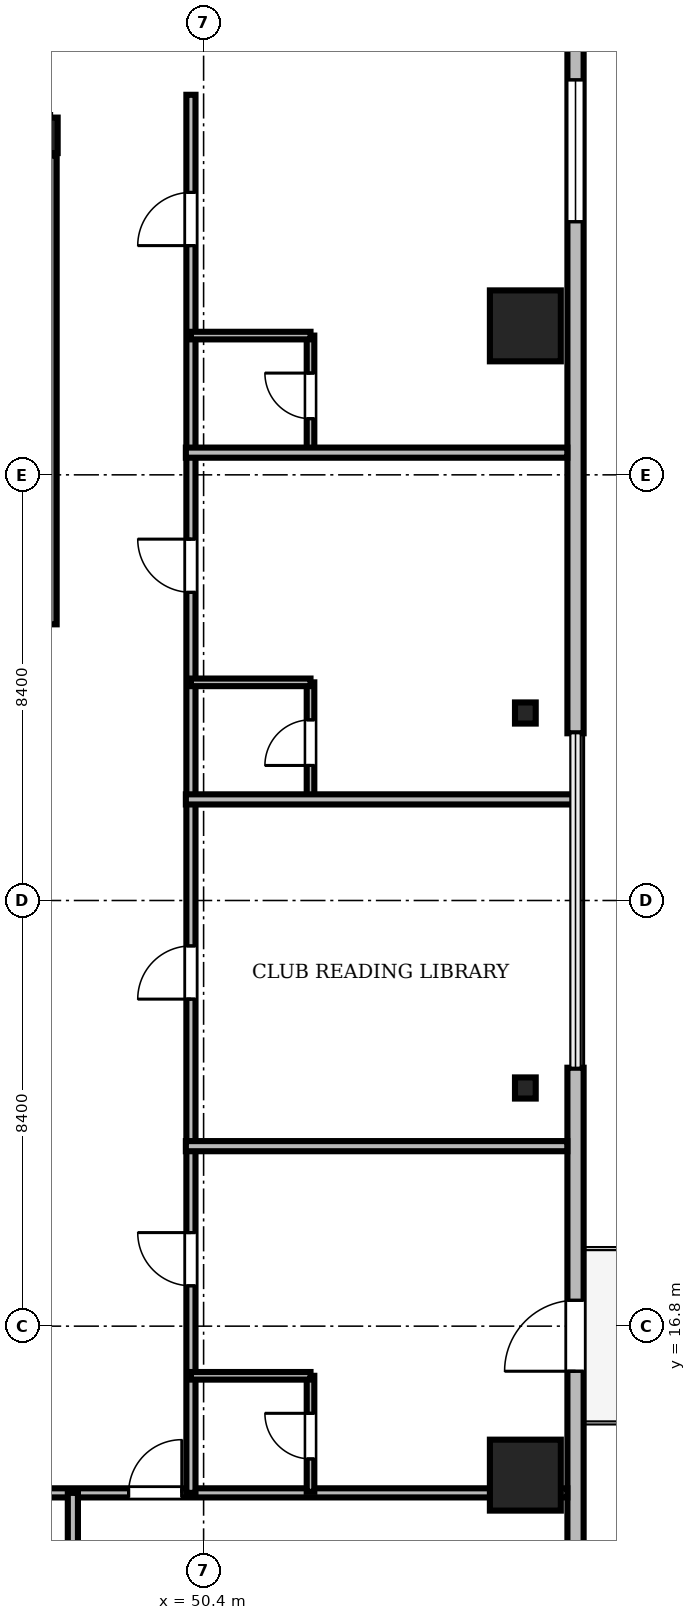
"""IFC4 building model, lengths in metres.
Left out: names, types, materials, properties, quantities, classifications, styles, units other than length and angle.
Written with IfcOpenShell. Run it as: python <this file> out.ifc"""

import sys

from ifc_helpers import new_model, si_unit, direction, frame, frame_2d, origin, origin_2d, place, context, subcontext, project, spatial, rectangle, i_section, extrude, source, transform, mapped, element, fill, save


model = new_model("IFC4")
c1 = context("Model", 3, precision=1e-05, world=origin(), true_north=direction((0.0, 1.0)))
c2 = subcontext(c1, "Body", "Model", "MODEL_VIEW")
j1 = project(units=[si_unit("LENGTHUNIT", "METRE"), si_unit("PLANEANGLEUNIT", "RADIAN")], contexts=[c1])
p1 = place(None, origin())
s1 = spatial("IfcSite", under=j1, at=p1, CompositionType="ELEMENT")
p2 = place(p1, origin())
s2 = spatial("IfcBuilding", under=s1, at=p2, CompositionType="ELEMENT")
p3 = place(p2, frame((0.0, 0.0, 211.05)))
s3 = spatial("IfcBuildingStorey", under=s2, at=p3, CompositionType="ELEMENT", Elevation=211.05)
m1 = source(origin(), c2, "Body", "SweptSolid", [
    extrude(i_section(OverallWidth=0.3, OverallDepth=0.7, WebThickness=0.017, FlangeThickness=0.032, FilletRadius=0.027, at=origin_2d()), origin(), (0.0, 0.0, 1.0), 3.53),
])
p4 = place(p3, frame((47.37, 40.3, 0.0), z_axis=(0.0, 0.0, 1.0), x_axis=(1.0, 0.0, 0.0)))
e1 = element("IfcColumn", 1, at=p4, inside=s3, PredefinedType="COLUMN", context=c2, shape_type="MappedRepresentation", body=[
    mapped(m1, transform((0.0, 0.0, 0.0), scale=1.0)),
])
m2 = source(origin(), c2, "Body", "SweptSolid", [
    extrude(rectangle(XDim=1.4, YDim=1.4, at=origin_2d()), origin(), (0.0, 0.0, 1.0), 3.53),
])
for number, where, z_axis, x_axis in (
    (2, (56.75, 13.86, 0.0), (0.0, 0.0, 1.0), (1.0, 0.0, 0.0)),
    (3, (56.75, 36.54, 0.0), (0.0, 0.0, 1.0), (1.0, 0.0, 0.0)),
):
    element("IfcColumn", number, at=place(p3, frame(where, z_axis=z_axis, x_axis=x_axis)), inside=s3, PredefinedType="COLUMN", context=c2, shape_type="MappedRepresentation", body=[
        mapped(m2, transform((0.0, 0.0, 0.0), scale=1.0)),
    ])
m3 = source(origin(), c2, "Body", "SweptSolid", [
    extrude(i_section(OverallWidth=0.409, OverallDepth=0.417, WebThickness=0.021, FlangeThickness=0.033, FilletRadius=0.015, at=origin_2d()), origin(), (0.0, 0.0, 1.0), 3.53),
])
for number, where, z_axis, x_axis in (
    (4, (56.75, 21.5, 0.0), (0.0, 0.0, 1.0), (1.0, 0.0, 0.0)),
    (5, (56.75, 28.9, 0.0), (0.0, 0.0, 1.0), (1.0, 0.0, 0.0)),
):
    element("IfcColumn", number, at=place(p3, frame(where, z_axis=z_axis, x_axis=x_axis)), inside=s3, PredefinedType="COLUMN", context=c2, shape_type="MappedRepresentation", body=[
        mapped(m3, transform((0.0, 0.0, 0.0), scale=1.0)),
    ])
m4 = source(origin(), c2, "Body", "SweptSolid", [
    extrude(rectangle(XDim=15.6, YDim=0.32, at=frame_2d((7.8, 0.0))), origin(), (0.0, 0.0, 1.0), 3.53),
])
p5 = place(p3, frame((57.74, 6.3, 0.0), z_axis=(0.0, 0.0, 1.0), x_axis=(0.0, 1.0, 0.0)))
e6 = element("IfcWall", 6, at=p5, inside=s3, PredefinedType="SOLIDWALL", context=c2, shape_type="MappedRepresentation", body=[
    mapped(m4, transform((0.0, 0.0, 0.0), scale=1.0)),
])
m5 = source(origin(), c2, "Body", "SweptSolid", [
    extrude(rectangle(XDim=1.4, YDim=2.3, at=frame_2d((0.7, 1.15))), frame((0.0, 0.17, 0.0), z_axis=(0.0, -1.0, 0.0), x_axis=(1.0, 0.0, 0.0)), (0.0, 0.0, 1.0), 0.34),
])
p6 = place(p5, frame((9.61, 0.0, 0.0)))
e7 = element("IfcOpeningElement", 7, at=p6, cuts=e6, PredefinedType="OPENING", context=c2, shape_type="MappedRepresentation", body=[
    mapped(m5, transform((0.0, 0.0, 0.0), scale=1.0)),
])
m6 = source(origin(), c2, "Body", "SweptSolid", [
    extrude(rectangle(XDim=2.8, YDim=2.4, at=frame_2d((1.4, 1.2))), frame((0.0, 0.17, 0.0), z_axis=(0.0, -1.0, 0.0), x_axis=(1.0, 0.0, 0.0)), (0.0, 0.0, 1.0), 0.34),
])
p7 = place(p5, frame((2.705, 0.0, 0.72)))
e8 = element("IfcOpeningElement", 8, at=p7, cuts=e6, PredefinedType="OPENING", context=c2, shape_type="MappedRepresentation", body=[
    mapped(m6, transform((0.0, 0.0, 0.0), scale=1.0)),
])
m7 = source(origin(), c2, "Body", "SweptSolid", [
    extrude(rectangle(XDim=15.6, YDim=0.32, at=frame_2d((7.8, 0.0))), origin(), (0.0, 0.0, 1.0), 3.53),
])
p8 = place(p3, frame((57.74, 28.5, 0.0), z_axis=(0.0, 0.0, 1.0), x_axis=(0.0, 1.0, 0.0)))
e9 = element("IfcWall", 9, at=p8, inside=s3, PredefinedType="SOLIDWALL", context=c2, shape_type="MappedRepresentation", body=[
    mapped(m7, transform((0.0, 0.0, 0.0), scale=1.0)),
])
p9 = place(p8, frame((10.095, 0.0, 0.72)))
e10 = element("IfcOpeningElement", 10, at=p9, cuts=e9, PredefinedType="OPENING", context=c2, shape_type="MappedRepresentation", body=[
    mapped(m6, transform((0.0, 0.0, 0.0), scale=1.0)),
])
m8 = source(origin(), c2, "Body", "SweptSolid", [
    extrude(rectangle(XDim=9.25, YDim=0.25, at=frame_2d((4.625, 0.0))), origin(), (0.0, 0.0, 1.0), 3.55),
])
p10 = place(p3, frame((47.375, 30.65, 0.0), z_axis=(0.0, 0.0, 1.0), x_axis=(0.0, 1.0, 0.0)))
e11 = element("IfcWall", 11, at=p10, inside=s3, PredefinedType="SOLIDWALL", context=c2, shape_type="MappedRepresentation", body=[
    mapped(m8, transform((0.0, 0.0, 0.0), scale=1.0)),
])
m9 = source(origin(), c2, "Body", "SweptSolid", [
    extrude(rectangle(XDim=46.156, YDim=0.18, at=frame_2d((23.078, 0.0))), origin(), (0.0, 0.0, 1.0), 2.772),
])
p11 = place(p3, frame((11.422, 13.51, 0.0), z_axis=(0.0, 0.0, 1.0), x_axis=(1.0, 0.0, 0.0)))
e12 = element("IfcWall", 12, at=p11, inside=s3, PredefinedType="PARTITIONING", context=c2, shape_type="MappedRepresentation", body=[
    mapped(m9, transform((0.0, 0.0, 0.0), scale=1.0)),
])
m10 = source(origin(), c2, "Body", "SweptSolid", [
    extrude(rectangle(XDim=1.05, YDim=2.2, at=frame_2d((0.525, 1.1))), frame((0.0, 0.1, 0.0), z_axis=(0.0, -1.0, 0.0), x_axis=(1.0, 0.0, 0.0)), (0.0, 0.0, 1.0), 0.2),
])
p12 = place(p11, frame((8.398, 0.0, 0.0)))
e13 = element("IfcOpeningElement", 13, at=p12, cuts=e12, PredefinedType="OPENING", context=c2, shape_type="MappedRepresentation", body=[
    mapped(m10, transform((0.0, 0.0, 0.0), scale=1.0)),
])
p13 = place(p11, frame((10.953, 0.0, 0.0)))
e14 = element("IfcOpeningElement", 14, at=p13, cuts=e12, PredefinedType="OPENING", context=c2, shape_type="MappedRepresentation", body=[
    mapped(m10, transform((0.0, 0.0, 0.0), scale=1.0)),
])
p14 = place(p11, frame((14.645, 0.0, 0.0)))
e15 = element("IfcOpeningElement", 15, at=p14, cuts=e12, PredefinedType="OPENING", context=c2, shape_type="MappedRepresentation", body=[
    mapped(m10, transform((0.0, 0.0, 0.0), scale=1.0)),
])
m11 = source(origin(), c2, "Body", "SweptSolid", [
    extrude(rectangle(XDim=0.95, YDim=2.15, at=frame_2d((0.475, 1.075))), frame((0.0, 0.1, 0.0), z_axis=(0.0, -1.0, 0.0), x_axis=(1.0, 0.0, 0.0)), (0.0, 0.0, 1.0), 0.2),
])
p15 = place(p11, frame((20.057, 0.0, 0.0)))
e16 = element("IfcOpeningElement", 16, at=p15, cuts=e12, PredefinedType="OPENING", context=c2, shape_type="MappedRepresentation", body=[
    mapped(m11, transform((0.0, 0.0, 0.0), scale=1.0)),
])
p16 = place(p11, frame((23.274, 0.0, 0.0)))
e17 = element("IfcOpeningElement", 17, at=p16, cuts=e12, PredefinedType="OPENING", context=c2, shape_type="MappedRepresentation", body=[
    mapped(m10, transform((0.0, 0.0, 0.0), scale=1.0)),
])
p17 = place(p11, frame((27.716, 0.0, 0.0)))
e18 = element("IfcOpeningElement", 18, at=p17, cuts=e12, PredefinedType="OPENING", context=c2, shape_type="MappedRepresentation", body=[
    mapped(m10, transform((0.0, 0.0, 0.0), scale=1.0)),
])
p18 = place(p11, frame((32.907, 0.0, 0.0)))
e19 = element("IfcOpeningElement", 19, at=p18, cuts=e12, PredefinedType="OPENING", context=c2, shape_type="MappedRepresentation", body=[
    mapped(m10, transform((0.0, 0.0, 0.0), scale=1.0)),
])
p19 = place(p11, frame((37.498, 0.0, 0.0)))
e20 = element("IfcOpeningElement", 20, at=p19, cuts=e12, PredefinedType="OPENING", context=c2, shape_type="MappedRepresentation", body=[
    mapped(m10, transform((0.0, 0.0, 0.0), scale=1.0)),
])
m12 = source(origin(), c2, "Body", "SweptSolid", [
    extrude(rectangle(XDim=27.59, YDim=0.18, at=frame_2d((13.795, 0.0))), origin(), (0.0, 0.0, 1.0), 2.972),
])
p20 = place(p3, frame((50.15, 13.51, 0.0), z_axis=(0.0, 0.0, 1.0), x_axis=(0.0, 1.0, 0.0)))
e21 = element("IfcWall", 21, at=p20, inside=s3, PredefinedType="PARTITIONING", context=c2, shape_type="MappedRepresentation", body=[
    mapped(m12, transform((0.0, 0.0, 0.0), scale=1.0)),
])
p21 = place(p20, frame((4.086, 0.0, 0.0)))
e22 = element("IfcOpeningElement", 22, at=p21, cuts=e21, PredefinedType="OPENING", context=c2, shape_type="MappedRepresentation", body=[
    mapped(m10, transform((0.0, 0.0, 0.0), scale=1.0)),
])
p22 = place(p20, frame((9.744, 0.0, 0.0)))
e23 = element("IfcOpeningElement", 23, at=p22, cuts=e21, PredefinedType="OPENING", context=c2, shape_type="MappedRepresentation", body=[
    mapped(m10, transform((0.0, 0.0, 0.0), scale=1.0)),
])
p23 = place(p20, frame((17.771, 0.0, 0.0)))
e24 = element("IfcOpeningElement", 24, at=p23, cuts=e21, PredefinedType="OPENING", context=c2, shape_type="MappedRepresentation", body=[
    mapped(m10, transform((0.0, 0.0, 0.0), scale=1.0)),
])
p24 = place(p20, frame((24.614, 0.0, 0.0)))
e25 = element("IfcOpeningElement", 25, at=p24, cuts=e21, PredefinedType="OPENING", context=c2, shape_type="MappedRepresentation", body=[
    mapped(m10, transform((0.0, 0.0, 0.0), scale=1.0)),
])
m13 = source(origin(), c2, "Body", "SweptSolid", [
    extrude(rectangle(XDim=2.29, YDim=0.15, at=frame_2d((1.145, 0.0))), origin(), (0.0, 0.0, 1.0), 2.972),
])
p25 = place(p3, frame((52.51, 13.53, 0.0), z_axis=(0.0, 0.0, 1.0), x_axis=(0.0, 1.0, 0.0)))
e26 = element("IfcWall", 26, at=p25, inside=s3, PredefinedType="PARTITIONING", context=c2, shape_type="MappedRepresentation", body=[
    mapped(m13, transform((0.0, 0.0, 0.0), scale=1.0)),
])
m14 = source(origin(), c2, "Body", "SweptSolid", [
    extrude(rectangle(XDim=0.9, YDim=2.1, at=frame_2d((0.45, 1.05))), frame((0.0, 0.085, 0.0), z_axis=(0.0, -1.0, 0.0), x_axis=(1.0, 0.0, 0.0)), (0.0, 0.0, 1.0), 0.17),
])
p26 = place(p25, frame((0.65, 0.0, 0.0)))
e27 = element("IfcOpeningElement", 27, at=p26, cuts=e26, PredefinedType="OPENING", context=c2, shape_type="MappedRepresentation", body=[
    mapped(m14, transform((0.0, 0.0, 0.0), scale=1.0)),
])
m15 = source(origin(), c2, "Body", "SweptSolid", [
    extrude(rectangle(XDim=2.29, YDim=0.15, at=frame_2d((1.145, 0.0))), origin(), (0.0, 0.0, 1.0), 2.972),
])
p27 = place(p3, frame((52.51, 27.215, 0.0), z_axis=(0.0, 0.0, 1.0), x_axis=(0.0, 1.0, 0.0)))
e28 = element("IfcWall", 28, at=p27, inside=s3, PredefinedType="PARTITIONING", context=c2, shape_type="MappedRepresentation", body=[
    mapped(m15, transform((0.0, 0.0, 0.0), scale=1.0)),
])
p28 = place(p27, frame((0.65, 0.0, 0.0)))
e29 = element("IfcOpeningElement", 29, at=p28, cuts=e28, PredefinedType="OPENING", context=c2, shape_type="MappedRepresentation", body=[
    mapped(m14, transform((0.0, 0.0, 0.0), scale=1.0)),
])
m16 = source(origin(), c2, "Body", "SweptSolid", [
    extrude(rectangle(XDim=2.29, YDim=0.15, at=frame_2d((1.145, 0.0))), origin(), (0.0, 0.0, 1.0), 3.53),
])
p29 = place(p3, frame((52.51, 34.058, 0.0), z_axis=(0.0, 0.0, 1.0), x_axis=(0.0, 1.0, 0.0)))
e30 = element("IfcWall", 30, at=p29, inside=s3, PredefinedType="PARTITIONING", context=c2, shape_type="MappedRepresentation", body=[
    mapped(m16, transform((0.0, 0.0, 0.0), scale=1.0)),
])
p30 = place(p29, frame((0.65, 0.0, 0.0)))
e31 = element("IfcOpeningElement", 31, at=p30, cuts=e30, PredefinedType="OPENING", context=c2, shape_type="MappedRepresentation", body=[
    mapped(m14, transform((0.0, 0.0, 0.0), scale=1.0)),
])
m17 = source(origin(), c2, "Body", "SweptSolid", [
    extrude(rectangle(XDim=11.388, YDim=0.2, at=frame_2d((5.694, 0.0))), origin(), (0.0, 0.0, 1.0), 2.772),
])
p31 = place(p3, frame((47.82, 2.122, 0.0), z_axis=(0.0, 0.0, 1.0), x_axis=(0.0, 1.0, 0.0)))
e32 = element("IfcWall", 32, at=p31, inside=s3, PredefinedType="PARTITIONING", context=c2, shape_type="MappedRepresentation", body=[
    mapped(m17, transform((0.0, 0.0, 0.0), scale=1.0)),
])
m18 = source(origin(), c2, "Body", "SweptSolid", [
    extrude(rectangle(XDim=7.528, YDim=0.2, at=frame_2d((3.764, 0.0))), origin(), (0.0, 0.0, 1.0), 2.772),
])
p32 = place(p3, frame((50.05, 20.352, 0.0), z_axis=(0.0, 0.0, 1.0), x_axis=(1.0, 0.0, 0.0)))
e33 = element("IfcWall", 33, at=p32, inside=s3, PredefinedType="PARTITIONING", context=c2, shape_type="MappedRepresentation", body=[
    mapped(m18, transform((0.0, 0.0, 0.0), scale=1.0)),
])
m19 = source(origin(), c2, "Body", "SweptSolid", [
    extrude(rectangle(XDim=7.72, YDim=0.2, at=frame_2d((3.86, 0.0))), origin(), (0.0, 0.0, 1.0), 2.772),
])
p33 = place(p3, frame((50.05, 27.195, 0.0), z_axis=(0.0, 0.0, 1.0), x_axis=(1.0, 0.0, 0.0)))
e34 = element("IfcWall", 34, at=p33, inside=s3, PredefinedType="PARTITIONING", context=c2, shape_type="MappedRepresentation", body=[
    mapped(m19, transform((0.0, 0.0, 0.0), scale=1.0)),
])
p34 = place(p3, frame((50.05, 34.038, 0.0), z_axis=(0.0, 0.0, 1.0), x_axis=(1.0, 0.0, 0.0)))
e35 = element("IfcWall", 35, at=p34, inside=s3, PredefinedType="PARTITIONING", context=c2, shape_type="MappedRepresentation", body=[
    mapped(m18, transform((0.0, 0.0, 0.0), scale=1.0)),
])
m20 = source(origin(), c2, "Body", "SweptSolid", [
    extrude(rectangle(XDim=2.36, YDim=0.15, at=frame_2d((1.18, 0.0))), origin(), (0.0, 0.0, 1.0), 3.53),
])
for number, where, z_axis, x_axis in (
    (36, (50.15, 15.82, 0.0), (0.0, 0.0, 1.0), (1.0, 0.0, 0.0)),
    (37, (50.15, 29.505, 0.0), (0.0, 0.0, 1.0), (1.0, 0.0, 0.0)),
    (38, (50.15, 36.348, 0.0), (0.0, 0.0, 1.0), (1.0, 0.0, 0.0)),
):
    element("IfcWall", number, at=place(p3, frame(where, z_axis=z_axis, x_axis=x_axis)), inside=s3, PredefinedType="PARTITIONING", context=c2, shape_type="MappedRepresentation", body=[
        mapped(m20, transform((0.0, 0.0, 0.0), scale=1.0)),
    ])
m21 = source(origin(), c2, "Body", "SweptSolid", [
    extrude(rectangle(XDim=1.4, YDim=2.3, at=frame_2d((0.7, 1.15))), frame((0.0, 0.025, 0.0), z_axis=(0.0, -1.0, 0.0), x_axis=(1.0, 0.0, 0.0)), (0.0, 0.0, 1.0), 0.05),
])
p35 = place(p6, frame((1.4, 0.0, 0.0), z_axis=(0.0, 0.0, 1.0), x_axis=(-1.0, 0.0, 0.0)))
e39 = element("IfcDoor", 39, at=p35, inside=s3, OperationType="DOUBLE_DOOR_SLIDING", PredefinedType="DOOR", context=c2, shape_type="MappedRepresentation", body=[
    mapped(m21, transform((0.0, 0.0, 0.0), scale=1.0)),
])
fill(e7, e39)
m22 = source(origin(), c2, "Body", "SweptSolid", [
    extrude(rectangle(XDim=2.8, YDim=2.4, at=frame_2d((1.4, 1.2))), frame((0.0, 0.03, 0.0), z_axis=(0.0, -1.0, 0.0), x_axis=(1.0, 0.0, 0.0)), (0.0, 0.0, 1.0), 0.06),
])
p36 = place(p9, origin())
e40 = element("IfcWindow", 40, at=p36, inside=s3, PartitioningType="SINGLE_PANEL", PredefinedType="WINDOW", context=c2, shape_type="MappedRepresentation", body=[
    mapped(m22, transform((0.0, 0.0, 0.0), scale=1.0)),
])
fill(e10, e40)
m23 = source(origin(), c2, "Body", "SweptSolid", [
    extrude(rectangle(XDim=1.05, YDim=2.2, at=frame_2d((0.525, 1.1))), frame((0.0, 0.025, 0.0), z_axis=(0.0, -1.0, 0.0), x_axis=(1.0, 0.0, 0.0)), (0.0, 0.0, 1.0), 0.05),
])
p37 = place(p19, origin())
e41 = element("IfcDoor", 41, at=p37, inside=s3, OperationType="SINGLE_SWING_RIGHT", PredefinedType="DOOR", context=c2, shape_type="MappedRepresentation", body=[
    mapped(m23, transform((0.0, 0.0, 0.0), scale=1.0)),
])
fill(e20, e41)
p38 = place(p21, origin())
e42 = element("IfcDoor", 42, at=p38, inside=s3, OperationType="SINGLE_SWING_RIGHT", PredefinedType="DOOR", context=c2, shape_type="MappedRepresentation", body=[
    mapped(m23, transform((0.0, 0.0, 0.0), scale=1.0)),
])
fill(e22, e42)
p39 = place(p22, origin())
e43 = element("IfcDoor", 43, at=p39, inside=s3, OperationType="SINGLE_SWING_LEFT", PredefinedType="DOOR", context=c2, shape_type="MappedRepresentation", body=[
    mapped(m23, transform((0.0, 0.0, 0.0), scale=1.0)),
])
fill(e23, e43)
p40 = place(p23, origin())
e44 = element("IfcDoor", 44, at=p40, inside=s3, OperationType="SINGLE_SWING_RIGHT", PredefinedType="DOOR", context=c2, shape_type="MappedRepresentation", body=[
    mapped(m23, transform((0.0, 0.0, 0.0), scale=1.0)),
])
fill(e24, e44)
p41 = place(p24, origin())
e45 = element("IfcDoor", 45, at=p41, inside=s3, OperationType="SINGLE_SWING_LEFT", PredefinedType="DOOR", context=c2, shape_type="MappedRepresentation", body=[
    mapped(m23, transform((0.0, 0.0, 0.0), scale=1.0)),
])
fill(e25, e45)
m24 = source(origin(), c2, "Body", "SweptSolid", [
    extrude(rectangle(XDim=0.9, YDim=2.1, at=frame_2d((0.45, 1.05))), frame((0.0, 0.025, 0.0), z_axis=(0.0, -1.0, 0.0), x_axis=(1.0, 0.0, 0.0)), (0.0, 0.0, 1.0), 0.05),
])
p42 = place(p26, origin())
e46 = element("IfcDoor", 46, at=p42, inside=s3, OperationType="SINGLE_SWING_RIGHT", PredefinedType="DOOR", context=c2, shape_type="MappedRepresentation", body=[
    mapped(m24, transform((0.0, 0.0, 0.0), scale=1.0)),
])
fill(e27, e46)
p43 = place(p28, origin())
e47 = element("IfcDoor", 47, at=p43, inside=s3, OperationType="SINGLE_SWING_LEFT", PredefinedType="DOOR", context=c2, shape_type="MappedRepresentation", body=[
    mapped(m24, transform((0.0, 0.0, 0.0), scale=1.0)),
])
fill(e29, e47)
p44 = place(p30, origin())
e48 = element("IfcDoor", 48, at=p44, inside=s3, OperationType="SINGLE_SWING_RIGHT", PredefinedType="DOOR", context=c2, shape_type="MappedRepresentation", body=[
    mapped(m24, transform((0.0, 0.0, 0.0), scale=1.0)),
])
fill(e31, e48)
save(model, sys.argv[1])
